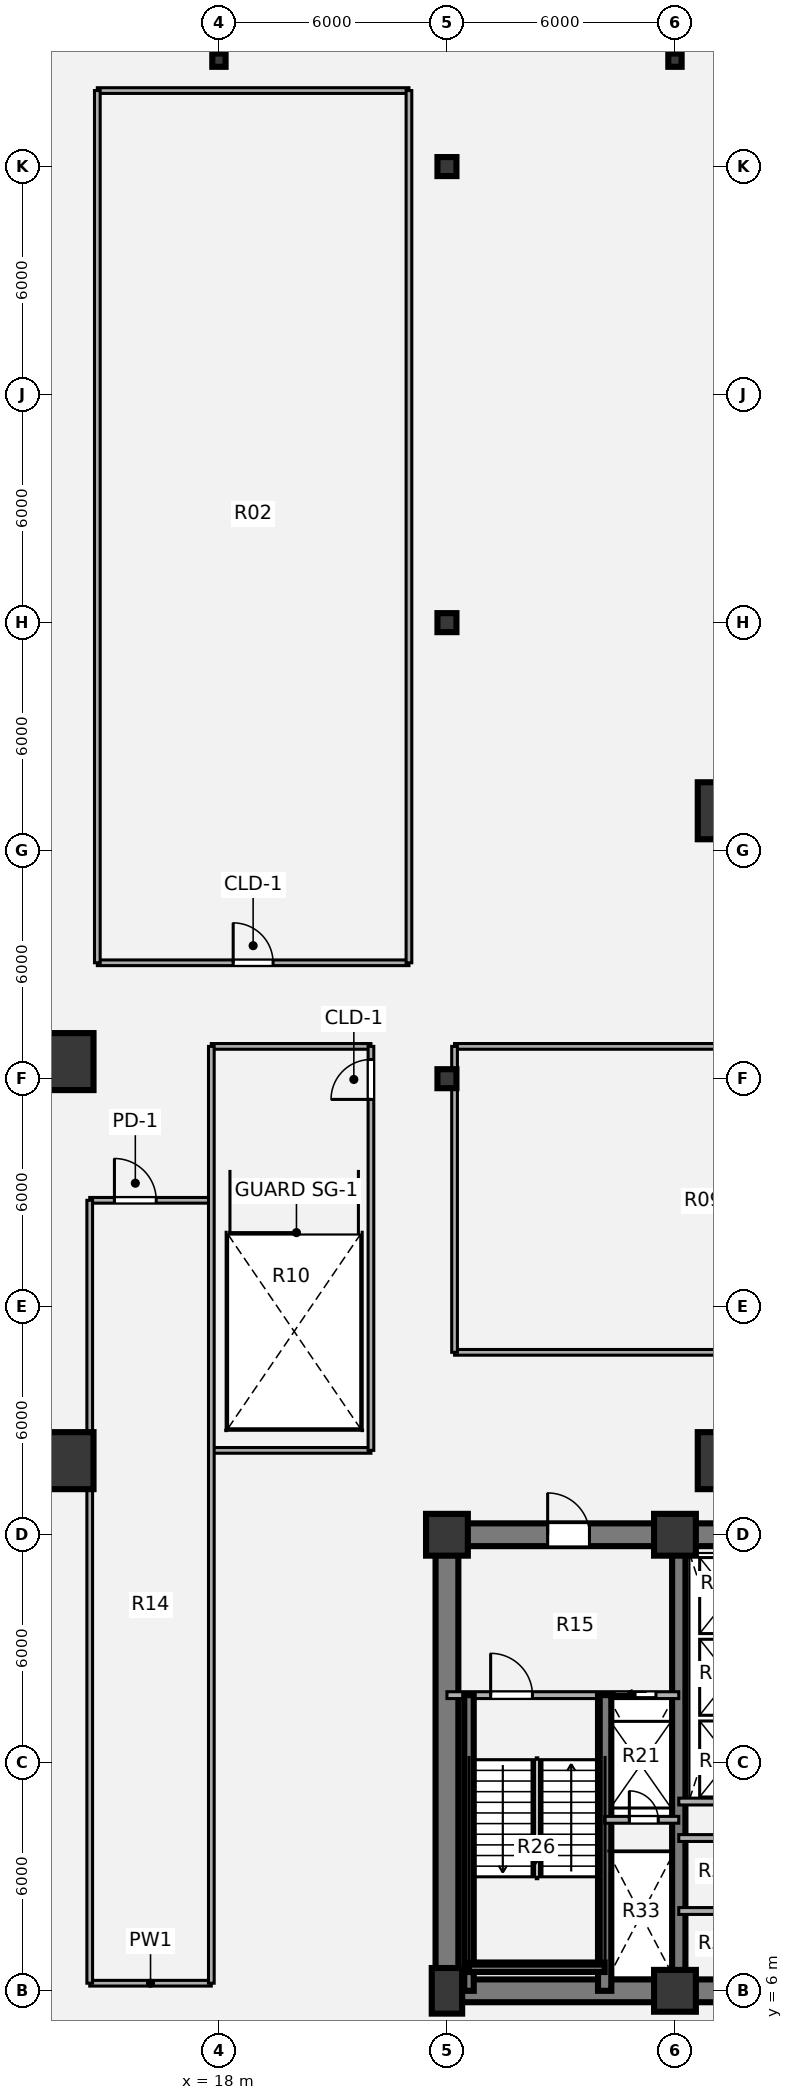
"""IFC4 building model, lengths in metres.
Left out: names, types, materials, properties, quantities, classifications, styles, units other than length and angle.
Written with IfcOpenShell. Run it as: python <this file> out.ifc"""

import sys

from ifc_helpers import new_model, si_unit, direction, frame, frame_2d, origin, origin_2d, place, context, subcontext, project, spatial, rectangle, hollow_circle, i_section, extrude, source, transform, mapped, element, fill, save


model = new_model("IFC4")
c1 = context("Model", 3, precision=1e-05, world=origin(), true_north=direction((0.0, 1.0)))
c2 = subcontext(c1, "Body", "Model", "MODEL_VIEW")
j1 = project(units=[si_unit("LENGTHUNIT", "METRE"), si_unit("PLANEANGLEUNIT", "RADIAN")], contexts=[c1])
p1 = place(None, origin())
s1 = spatial("IfcSite", under=j1, at=p1, CompositionType="ELEMENT")
p2 = place(p1, origin())
s2 = spatial("IfcBuilding", under=s1, at=p2, CompositionType="ELEMENT")
p3 = place(p2, frame((0.0, 0.0, 22.68)))
s3 = spatial("IfcBuildingStorey", under=s2, at=p3, CompositionType="ELEMENT", Elevation=22.68)
m1 = source(origin(), c2, "Body", "SweptSolid", [
    extrude(rectangle(XDim=0.8, YDim=1.2, at=origin_2d()), origin(), (0.0, 0.0, 1.0), 4.32),
])
p4 = place(p3, frame((24.0, 6.0, 0.0), z_axis=(0.0, 0.0, 1.0), x_axis=(1.0, 0.0, 0.0)))
e1 = element("IfcColumn", 1, at=p4, inside=s3, PredefinedType="COLUMN", context=c2, shape_type="MappedRepresentation", body=[
    mapped(m1, transform((0.0, 0.0, 0.0), x_axis=(1.0, 0.0, 0.0), y_axis=(0.0, 1.0, 0.0), z_axis=(0.0, 0.0, 1.0), scale=1.0)),
])
m2 = source(origin(), c2, "Body", "SweptSolid", [
    extrude(rectangle(XDim=1.1, YDim=1.1, at=origin_2d()), origin(), (0.0, 0.0, 1.0), 4.32),
])
for number, where, z_axis, x_axis in (
    (2, (30.0, 6.0, 0.0), (0.0, 0.0, 1.0), (1.0, 0.0, 0.0)),
    (3, (24.0, 18.0, 0.0), (0.0, 0.0, 1.0), (1.0, 0.0, 0.0)),
    (4, (30.0, 18.0, 0.0), (0.0, 0.0, 1.0), (1.0, 0.0, 0.0)),
):
    element("IfcColumn", number, at=place(p3, frame(where, z_axis=z_axis, x_axis=x_axis)), inside=s3, PredefinedType="COLUMN", context=c2, shape_type="MappedRepresentation", body=[
        mapped(m2, transform((0.0, 0.0, 0.0), x_axis=(1.0, 0.0, 0.0), y_axis=(0.0, 1.0, 0.0), z_axis=(0.0, 0.0, 1.0), scale=1.0)),
    ])
p5 = place(p3, frame((48.3, 6.0, 0.0), z_axis=(0.0, 0.0, 1.0), x_axis=(-1.0, 0.0, 0.0)))
e5 = element("IfcWall", 5, at=p5, inside=s3, PredefinedType="SHEAR", context=c2, shape_type="SweptSolid", body=[
    extrude(rectangle(XDim=24.6, YDim=0.6, at=frame_2d((12.3, 0.0))), origin(), (0.0, 0.0, 1.0), 4.32),
])
p6 = place(p3, frame((24.0, 6.0, 0.0), z_axis=(0.0, 0.0, 1.0), x_axis=(0.0, 1.0, 0.0)))
e6 = element("IfcWall", 6, at=p6, inside=s3, PredefinedType="SHEAR", context=c2, shape_type="SweptSolid", body=[
    extrude(rectangle(XDim=12.0, YDim=0.6, at=frame_2d((6.0, 0.0))), origin(), (0.0, 0.0, 1.0), 4.32),
])
p7 = place(p3, frame((23.7, 18.0, 0.0), z_axis=(0.0, 0.0, 1.0), x_axis=(1.0, 0.0, 0.0)))
e7 = element("IfcWall", 7, at=p7, inside=s3, PredefinedType="SHEAR", context=c2, shape_type="SweptSolid", body=[
    extrude(rectangle(XDim=9.5, YDim=0.6, at=frame_2d((4.75, 0.0))), origin(), (0.0, 0.0, 1.0), 4.32),
])
p8 = place(p7, frame((2.95, 0.0, 0.0)))
e8 = element("IfcOpeningElement", 8, at=p8, cuts=e7, PredefinedType="OPENING", context=c2, shape_type="SweptSolid", body=[
    extrude(rectangle(XDim=1.1, YDim=2.1, at=origin_2d()), frame((0.55, 0.31, 1.05), z_axis=(0.0, -1.0, 0.0), x_axis=(1.0, 0.0, 0.0)), (0.0, 0.0, 1.0), 0.62),
])
p9 = place(p3, frame((30.1, 6.0, 0.0), z_axis=(0.0, 0.0, 1.0), x_axis=(0.0, 1.0, 0.0)))
e9 = element("IfcWall", 9, at=p9, inside=s3, PredefinedType="SHEAR", context=c2, shape_type="SweptSolid", body=[
    extrude(rectangle(XDim=12.0, YDim=0.35, at=frame_2d((6.0, 0.0))), origin(), (0.0, 0.0, 1.0), 4.32),
])
m3 = source(origin(), c2, "Body", "SweptSolid", [
    extrude(i_section(OverallWidth=0.5, OverallDepth=0.5, WebThickness=0.022, FlangeThickness=0.035, at=origin_2d()), origin(), (0.0, 0.0, 1.0), 4.32),
])
for number, where, z_axis, x_axis in (
    (10, (24.0, 30.0, 0.0), (0.0, 0.0, 1.0), (1.0, 0.0, 0.0)),
    (11, (24.0, 42.0, 0.0), (0.0, 0.0, 1.0), (1.0, 0.0, 0.0)),
    (12, (24.0, 54.0, 0.0), (0.0, 0.0, 1.0), (1.0, 0.0, 0.0)),
):
    element("IfcColumn", number, at=place(p3, frame(where, z_axis=z_axis, x_axis=x_axis)), inside=s3, PredefinedType="COLUMN", context=c2, shape_type="MappedRepresentation", body=[
        mapped(m3, transform((0.0, 0.0, 0.0), x_axis=(1.0, 0.0, 0.0), y_axis=(0.0, 1.0, 0.0), z_axis=(0.0, 0.0, 1.0), scale=1.0)),
    ])
m4 = source(origin(), c2, "Body", "SweptSolid", [
    extrude(i_section(OverallWidth=0.35, OverallDepth=0.35, WebThickness=0.02, FlangeThickness=0.028, at=origin_2d()), origin(), (0.0, 0.0, 1.0), 4.32),
])
for number, where, z_axis, x_axis in (
    (13, (18.0, 56.8, 0.0), (0.0, 0.0, 1.0), (1.0, 0.0, 0.0)),
    (14, (30.0, 56.8, 0.0), (0.0, 0.0, 1.0), (1.0, 0.0, 0.0)),
):
    element("IfcColumn", number, at=place(p3, frame(where, z_axis=z_axis, x_axis=x_axis)), inside=s3, PredefinedType="COLUMN", context=c2, shape_type="MappedRepresentation", body=[
        mapped(m4, transform((0.0, 0.0, 0.0), x_axis=(1.0, 0.0, 0.0), y_axis=(0.0, 1.0, 0.0), z_axis=(0.0, 0.0, 1.0), scale=1.0)),
    ])
m5 = source(origin(), c2, "Body", "SweptSolid", [
    extrude(hollow_circle(Radius=0.75, WallThickness=0.05, at=origin_2d()), origin(), (0.0, 0.0, 1.0), 4.32),
])
for number, where, z_axis, x_axis in (
    (15, (13.95, 19.95, 0.0), (0.0, 0.0, 1.0), (1.0, 0.0, 0.0)),
    (16, (13.95, 30.45, 0.0), (0.0, 0.0, 1.0), (1.0, 0.0, 0.0)),
    (17, (31.35, 19.95, 0.0), (0.0, 0.0, 1.0), (1.0, 0.0, 0.0)),
    (18, (31.35, 37.05, 0.0), (0.0, 0.0, 1.0), (1.0, 0.0, 0.0)),
):
    element("IfcColumn", number, at=place(p3, frame(where, z_axis=z_axis, x_axis=x_axis)), inside=s3, PredefinedType="COLUMN", context=c2, shape_type="MappedRepresentation", body=[
        mapped(m5, transform((0.0, 0.0, 0.0), x_axis=(1.0, 0.0, 0.0), y_axis=(0.0, 1.0, 0.0), z_axis=(0.0, 0.0, 1.0), scale=1.0)),
    ])
for number, where, z_axis, x_axis in (
    (19, (30.1, 10.98, 0.0), (0.0, 0.0, 1.0), (1.0, 0.0, 0.0)),
    (20, (30.1, 8.1, 0.0), (0.0, 0.0, 1.0), (1.0, 0.0, 0.0)),
    (21, (30.1, 10.02, 0.0), (0.0, 0.0, 1.0), (1.0, 0.0, 0.0)),
):
    element("IfcWall", number, at=place(p3, frame(where, z_axis=z_axis, x_axis=x_axis)), inside=s3, PredefinedType="PARTITIONING", context=c2, shape_type="SweptSolid", body=[
        extrude(rectangle(XDim=2.5, YDim=0.18, at=frame_2d((1.25, 0.0))), origin(), (0.0, 0.0, 1.0), 3.97),
    ])
p10 = place(p3, frame((24.0, 13.78, 0.0), z_axis=(0.0, 0.0, 1.0), x_axis=(1.0, 0.0, 0.0)))
e22 = element("IfcWall", 22, at=p10, inside=s3, PredefinedType="PARTITIONING", context=c2, shape_type="SweptSolid", body=[
    extrude(rectangle(XDim=6.1, YDim=0.18, at=frame_2d((3.05, 0.0))), origin(), (0.0, 0.0, 1.0), 3.97),
])
p11 = place(p10, frame((1.15, 0.0, 0.0)))
e23 = element("IfcOpeningElement", 23, at=p11, cuts=e22, PredefinedType="OPENING", context=c2, shape_type="SweptSolid", body=[
    extrude(rectangle(XDim=1.1, YDim=2.1, at=origin_2d()), frame((0.55, 0.1, 1.05), z_axis=(0.0, -1.0, 0.0), x_axis=(1.0, 0.0, 0.0)), (0.0, 0.0, 1.0), 0.2),
])
p12 = place(p10, frame((4.4, 0.0, 0.0)))
e24 = element("IfcOpeningElement", 24, at=p12, cuts=e22, PredefinedType="OPENING", context=c2, shape_type="SweptSolid", body=[
    extrude(rectangle(XDim=1.1, YDim=2.1, at=origin_2d()), frame((0.55, 0.1, 1.05), z_axis=(0.0, -1.0, 0.0), x_axis=(1.0, 0.0, 0.0)), (0.0, 0.0, 1.0), 0.2),
])
p13 = place(p3, frame((28.15, 6.0, 0.0), z_axis=(0.0, 0.0, 1.0), x_axis=(0.0, 1.0, 0.0)))
e25 = element("IfcWall", 25, at=p13, inside=s3, PredefinedType="SHEAR", context=c2, shape_type="SweptSolid", body=[
    extrude(rectangle(XDim=7.78, YDim=0.35, at=frame_2d((3.89, 0.0))), origin(), (0.0, 0.0, 1.0), 4.32),
])
p14 = place(p3, frame((24.58, 6.0, 0.0), z_axis=(0.0, 0.0, 1.0), x_axis=(0.0, 1.0, 0.0)))
e26 = element("IfcWall", 26, at=p14, inside=s3, PredefinedType="SHEAR", context=c2, shape_type="SweptSolid", body=[
    extrude(rectangle(XDim=7.78, YDim=0.25, at=frame_2d((3.89, 0.0))), origin(), (0.0, 0.0, 1.0), 4.32),
])
p15 = place(p3, frame((24.58, 6.62, 0.0), z_axis=(0.0, 0.0, 1.0), x_axis=(1.0, 0.0, 0.0)))
e27 = element("IfcWall", 27, at=p15, inside=s3, PredefinedType="SHEAR", context=c2, shape_type="SweptSolid", body=[
    extrude(rectangle(XDim=3.57, YDim=0.25, at=frame_2d((1.785, 0.0))), origin(), (0.0, 0.0, 1.0), 4.32),
])
p16 = place(p3, frame((28.15, 10.5, 0.0), z_axis=(0.0, 0.0, 1.0), x_axis=(1.0, 0.0, 0.0)))
e28 = element("IfcWall", 28, at=p16, inside=s3, PredefinedType="PARTITIONING", context=c2, shape_type="SweptSolid", body=[
    extrude(rectangle(XDim=1.95, YDim=0.18, at=frame_2d((0.975, 0.0))), origin(), (0.0, 0.0, 1.0), 3.97),
])
p17 = place(p16, frame((0.65, 0.0, 0.0)))
e29 = element("IfcOpeningElement", 29, at=p17, cuts=e28, PredefinedType="OPENING", context=c2, shape_type="SweptSolid", body=[
    extrude(rectangle(XDim=0.76, YDim=2.05, at=origin_2d()), frame((0.38, 0.1, 1.025), z_axis=(0.0, -1.0, 0.0), x_axis=(1.0, 0.0, 0.0)), (0.0, 0.0, 1.0), 0.2),
])
p18 = place(p3, frame((14.6, 6.2, 0.0), z_axis=(0.0, 0.0, 1.0), x_axis=(1.0, 0.0, 0.0)))
e30 = element("IfcWall", 30, at=p18, inside=s3, PredefinedType="PARTITIONING", context=c2, shape_type="SweptSolid", body=[
    extrude(rectangle(XDim=3.2, YDim=0.15, at=frame_2d((1.6, 0.0))), origin(), (0.0, 0.0, 1.0), 2.185),
])
p19 = place(p3, frame((17.8, 20.22, 0.0), z_axis=(0.0, 0.0, 1.0), x_axis=(1.0, 0.0, 0.0)))
e31 = element("IfcWall", 31, at=p19, inside=s3, PredefinedType="PARTITIONING", context=c2, shape_type="SweptSolid", body=[
    extrude(rectangle(XDim=4.2, YDim=0.15, at=frame_2d((2.1, 0.0))), origin(), (0.0, 0.0, 1.0), 2.185),
])
p20 = place(p3, frame((24.2, 22.8, 0.0), z_axis=(0.0, 0.0, 1.0), x_axis=(1.0, 0.0, 0.0)))
e32 = element("IfcWall", 32, at=p20, inside=s3, PredefinedType="PARTITIONING", context=c2, shape_type="SweptSolid", body=[
    extrude(rectangle(XDim=23.6, YDim=0.15, at=frame_2d((11.8, 0.0))), origin(), (0.0, 0.0, 1.0), 3.97),
])
p21 = place(p3, frame((14.6, 26.8, 0.0), z_axis=(0.0, 0.0, 1.0), x_axis=(1.0, 0.0, 0.0)))
e33 = element("IfcWall", 33, at=p21, inside=s3, PredefinedType="PARTITIONING", context=c2, shape_type="SweptSolid", body=[
    extrude(rectangle(XDim=3.2, YDim=0.15, at=frame_2d((1.6, 0.0))), origin(), (0.0, 0.0, 1.0), 3.97),
])
p22 = place(p21, frame((0.65, 0.0, 0.0)))
e34 = element("IfcOpeningElement", 34, at=p22, cuts=e33, PredefinedType="OPENING", context=c2, shape_type="SweptSolid", body=[
    extrude(rectangle(XDim=1.1, YDim=2.1, at=origin_2d()), frame((0.55, 0.085, 1.05), z_axis=(0.0, -1.0, 0.0), x_axis=(1.0, 0.0, 0.0)), (0.0, 0.0, 1.0), 0.17),
])
p23 = place(p3, frame((17.8, 30.85, 0.0), z_axis=(0.0, 0.0, 1.0), x_axis=(1.0, 0.0, 0.0)))
e35 = element("IfcWall", 35, at=p23, inside=s3, PredefinedType="PARTITIONING", context=c2, shape_type="SweptSolid", body=[
    extrude(rectangle(XDim=4.2, YDim=0.15, at=frame_2d((2.1, 0.0))), origin(), (0.0, 0.0, 1.0), 3.97),
])
p24 = place(p3, frame((24.2, 30.85, 0.0), z_axis=(0.0, 0.0, 1.0), x_axis=(1.0, 0.0, 0.0)))
e36 = element("IfcWall", 36, at=p24, inside=s3, PredefinedType="PARTITIONING", context=c2, shape_type="SweptSolid", body=[
    extrude(rectangle(XDim=23.6, YDim=0.15, at=frame_2d((11.8, 0.0))), origin(), (0.0, 0.0, 1.0), 3.97),
])
p25 = place(p24, frame((13.515, 0.0, 0.0)))
e37 = element("IfcOpeningElement", 37, at=p25, cuts=e36, PredefinedType="OPENING", context=c2, shape_type="SweptSolid", body=[
    extrude(rectangle(XDim=1.05, YDim=2.1, at=origin_2d()), frame((0.525, 0.085, 1.05), z_axis=(0.0, -1.0, 0.0), x_axis=(1.0, 0.0, 0.0)), (0.0, 0.0, 1.0), 0.17),
])
p26 = place(p3, frame((14.8, 33.05, 0.0), z_axis=(0.0, 0.0, 1.0), x_axis=(1.0, 0.0, 0.0)))
e38 = element("IfcWall", 38, at=p26, inside=s3, PredefinedType="PARTITIONING", context=c2, shape_type="SweptSolid", body=[
    extrude(rectangle(XDim=8.2, YDim=0.15, at=frame_2d((4.1, 0.0))), origin(), (0.0, 0.0, 1.0), 2.185),
])
p27 = place(p26, frame((3.575, 0.0, 0.0)))
e39 = element("IfcOpeningElement", 39, at=p27, cuts=e38, PredefinedType="OPENING", context=c2, shape_type="SweptSolid", body=[
    extrude(rectangle(XDim=1.05, YDim=2.1, at=origin_2d()), frame((0.525, 0.085, 1.05), z_axis=(0.0, -1.0, 0.0), x_axis=(1.0, 0.0, 0.0)), (0.0, 0.0, 1.0), 0.17),
])
p28 = place(p3, frame((14.8, 56.0, 0.0), z_axis=(0.0, 0.0, 1.0), x_axis=(1.0, 0.0, 0.0)))
e40 = element("IfcWall", 40, at=p28, inside=s3, PredefinedType="PARTITIONING", context=c2, shape_type="SweptSolid", body=[
    extrude(rectangle(XDim=8.2, YDim=0.15, at=frame_2d((4.1, 0.0))), origin(), (0.0, 0.0, 1.0), 3.97),
])
p29 = place(p3, frame((14.6, 6.2, 0.0), z_axis=(0.0, 0.0, 1.0), x_axis=(0.0, 1.0, 0.0)))
e41 = element("IfcWall", 41, at=p29, inside=s3, PredefinedType="PARTITIONING", context=c2, shape_type="SweptSolid", body=[
    extrude(rectangle(XDim=20.6, YDim=0.15, at=frame_2d((10.3, 0.0))), origin(), (0.0, 0.0, 1.0), 3.678),
])
p30 = place(p3, frame((14.8, 33.05, 0.0), z_axis=(0.0, 0.0, 1.0), x_axis=(0.0, 1.0, 0.0)))
e42 = element("IfcWall", 42, at=p30, inside=s3, PredefinedType="PARTITIONING", context=c2, shape_type="SweptSolid", body=[
    extrude(rectangle(XDim=22.95, YDim=0.15, at=frame_2d((11.475, 0.0))), origin(), (0.0, 0.0, 1.0), 3.626),
])
p31 = place(p3, frame((17.8, 6.2, 0.0), z_axis=(0.0, 0.0, 1.0), x_axis=(0.0, 1.0, 0.0)))
e43 = element("IfcWall", 43, at=p31, inside=s3, PredefinedType="PARTITIONING", context=c2, shape_type="SweptSolid", body=[
    extrude(rectangle(XDim=24.65, YDim=0.15, at=frame_2d((12.325, 0.0))), origin(), (0.0, 0.0, 1.0), 3.626),
])
p32 = place(p3, frame((22.0, 20.22, 0.0), z_axis=(0.0, 0.0, 1.0), x_axis=(0.0, 1.0, 0.0)))
e44 = element("IfcWall", 44, at=p32, inside=s3, PredefinedType="PARTITIONING", context=c2, shape_type="SweptSolid", body=[
    extrude(rectangle(XDim=10.63, YDim=0.15, at=frame_2d((5.315, 0.0))), origin(), (0.0, 0.0, 1.0), 3.626),
])
p33 = place(p32, frame((9.235, 0.0, 0.0)))
e45 = element("IfcOpeningElement", 45, at=p33, cuts=e44, PredefinedType="OPENING", context=c2, shape_type="SweptSolid", body=[
    extrude(rectangle(XDim=1.05, YDim=2.1, at=origin_2d()), frame((0.525, 0.085, 1.05), z_axis=(0.0, -1.0, 0.0), x_axis=(1.0, 0.0, 0.0)), (0.0, 0.0, 1.0), 0.17),
])
p34 = place(p3, frame((23.0, 33.05, 0.0), z_axis=(0.0, 0.0, 1.0), x_axis=(0.0, 1.0, 0.0)))
e46 = element("IfcWall", 46, at=p34, inside=s3, PredefinedType="PARTITIONING", context=c2, shape_type="SweptSolid", body=[
    extrude(rectangle(XDim=22.95, YDim=0.15, at=frame_2d((11.475, 0.0))), origin(), (0.0, 0.0, 1.0), 3.97),
])
p35 = place(p3, frame((24.2, 22.8, 0.0), z_axis=(0.0, 0.0, 1.0), x_axis=(0.0, 1.0, 0.0)))
e47 = element("IfcWall", 47, at=p35, inside=s3, PredefinedType="PARTITIONING", context=c2, shape_type="SweptSolid", body=[
    extrude(rectangle(XDim=8.05, YDim=0.15, at=frame_2d((4.025, 0.0))), origin(), (0.0, 0.0, 1.0), 2.185),
])
m6 = source(origin(), c2, "Body", "SweptSolid", [
    extrude(rectangle(XDim=1.1, YDim=2.1, at=origin_2d()), frame((0.55, 0.025, 1.05), z_axis=(0.0, -1.0, 0.0), x_axis=(1.0, 0.0, 0.0)), (0.0, 0.0, 1.0), 0.05),
])
p36 = place(p11, origin())
e48 = element("IfcDoor", 48, at=p36, inside=s3, OperationType="SINGLE_SWING_LEFT", PredefinedType="DOOR", context=c2, shape_type="MappedRepresentation", body=[
    mapped(m6, transform((0.0, 0.0, 0.0), x_axis=(1.0, 0.0, 0.0), y_axis=(0.0, 1.0, 0.0), z_axis=(0.0, 0.0, 1.0), scale=1.0)),
])
fill(e23, e48)
m7 = source(origin(), c2, "Body", "SweptSolid", [
    extrude(rectangle(XDim=1.1, YDim=2.1, at=origin_2d()), frame((0.55, 0.025, 1.05), z_axis=(0.0, -1.0, 0.0), x_axis=(1.0, 0.0, 0.0)), (0.0, 0.0, 1.0), 0.05),
])
p37 = place(p12, origin())
e49 = element("IfcDoor", 49, at=p37, inside=s3, OperationType="SLIDING_TO_LEFT", PredefinedType="DOOR", context=c2, shape_type="MappedRepresentation", body=[
    mapped(m7, transform((0.0, 0.0, 0.0), x_axis=(1.0, 0.0, 0.0), y_axis=(0.0, 1.0, 0.0), z_axis=(0.0, 0.0, 1.0), scale=1.0)),
])
fill(e24, e49)
m8 = source(origin(), c2, "Body", "SweptSolid", [
    extrude(rectangle(XDim=0.76, YDim=2.05, at=origin_2d()), frame((0.38, 0.025, 1.025), z_axis=(0.0, -1.0, 0.0), x_axis=(1.0, 0.0, 0.0)), (0.0, 0.0, 1.0), 0.05),
])
p38 = place(p17, origin())
e50 = element("IfcDoor", 50, at=p38, inside=s3, OperationType="SINGLE_SWING_LEFT", PredefinedType="DOOR", context=c2, shape_type="MappedRepresentation", body=[
    mapped(m8, transform((0.0, 0.0, 0.0), x_axis=(1.0, 0.0, 0.0), y_axis=(0.0, 1.0, 0.0), z_axis=(0.0, 0.0, 1.0), scale=1.0)),
])
fill(e29, e50)
m9 = source(origin(), c2, "Body", "SweptSolid", [
    extrude(rectangle(XDim=1.1, YDim=2.1, at=origin_2d()), frame((0.55, 0.025, 1.05), z_axis=(0.0, -1.0, 0.0), x_axis=(1.0, 0.0, 0.0)), (0.0, 0.0, 1.0), 0.05),
])
p39 = place(p8, origin())
e51 = element("IfcDoor", 51, at=p39, inside=s3, OperationType="SINGLE_SWING_LEFT", PredefinedType="DOOR", context=c2, shape_type="MappedRepresentation", body=[
    mapped(m9, transform((0.0, 0.0, 0.0), x_axis=(1.0, 0.0, 0.0), y_axis=(0.0, 1.0, 0.0), z_axis=(0.0, 0.0, 1.0), scale=1.0)),
])
fill(e8, e51)
m10 = source(origin(), c2, "Body", "SweptSolid", [
    extrude(rectangle(XDim=1.1, YDim=2.1, at=origin_2d()), frame((0.55, 0.025, 1.05), z_axis=(0.0, -1.0, 0.0), x_axis=(1.0, 0.0, 0.0)), (0.0, 0.0, 1.0), 0.05),
])
p40 = place(p22, origin())
e52 = element("IfcDoor", 52, at=p40, inside=s3, OperationType="SINGLE_SWING_LEFT", PredefinedType="DOOR", context=c2, shape_type="MappedRepresentation", body=[
    mapped(m10, transform((0.0, 0.0, 0.0), x_axis=(1.0, 0.0, 0.0), y_axis=(0.0, 1.0, 0.0), z_axis=(0.0, 0.0, 1.0), scale=1.0)),
])
fill(e34, e52)
m11 = source(origin(), c2, "Body", "SweptSolid", [
    extrude(rectangle(XDim=1.05, YDim=2.1, at=origin_2d()), frame((0.525, 0.025, 1.05), z_axis=(0.0, -1.0, 0.0), x_axis=(1.0, 0.0, 0.0)), (0.0, 0.0, 1.0), 0.05),
])
p41 = place(p27, origin())
e53 = element("IfcDoor", 53, at=p41, inside=s3, OperationType="SINGLE_SWING_LEFT", PredefinedType="DOOR", context=c2, shape_type="MappedRepresentation", body=[
    mapped(m11, transform((0.0, 0.0, 0.0), x_axis=(1.0, 0.0, 0.0), y_axis=(0.0, 1.0, 0.0), z_axis=(0.0, 0.0, 1.0), scale=1.0)),
])
fill(e39, e53)
p42 = place(p33, origin())
e54 = element("IfcDoor", 54, at=p42, inside=s3, OperationType="SINGLE_SWING_LEFT", PredefinedType="DOOR", context=c2, shape_type="MappedRepresentation", body=[
    mapped(m11, transform((0.0, 0.0, 0.0), x_axis=(1.0, 0.0, 0.0), y_axis=(0.0, 1.0, 0.0), z_axis=(0.0, 0.0, 1.0), scale=1.0)),
])
fill(e45, e54)
save(model, sys.argv[1])
